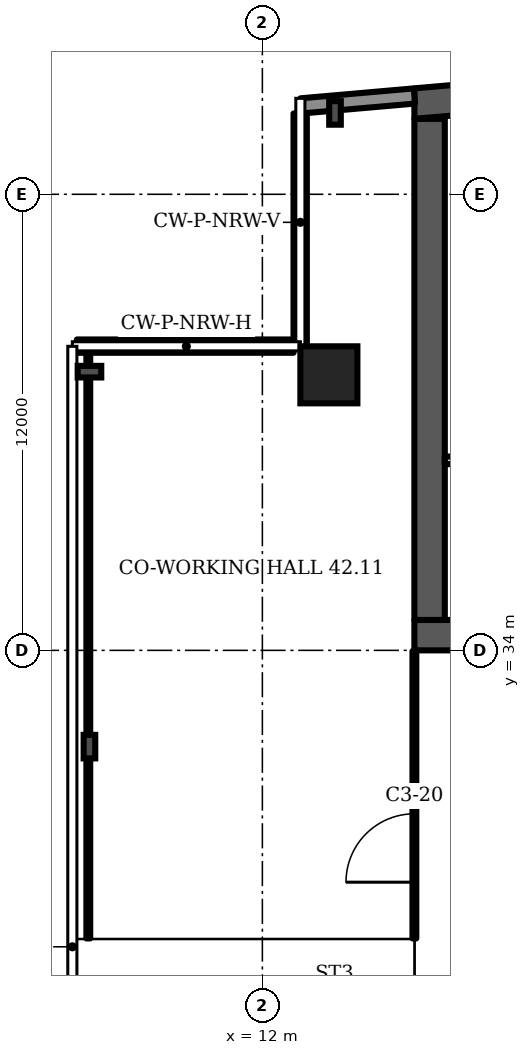
"""IFC4 building model, lengths in metres.
Left out: names, types, materials, properties, quantities, classifications, styles, units other than length and angle.
Written with IfcOpenShell. Run it as: python <this file> out.ifc"""

import sys

from ifc_helpers import new_model, si_unit, direction, frame, frame_2d, origin, origin_2d, place, context, subcontext, project, spatial, polyline, rectangle, i_section, outline, extrude, element, fill, save


model = new_model("IFC4")
c1 = context("Model", 3, precision=1e-05, world=origin(), true_north=direction((0.0, 1.0)))
c2 = subcontext(c1, "Body", "Model", "MODEL_VIEW")
j1 = project(units=[si_unit("LENGTHUNIT", "METRE"), si_unit("PLANEANGLEUNIT", "RADIAN")], contexts=[c1])
p1 = place(None, origin())
s1 = spatial("IfcSite", under=j1, at=p1, CompositionType="ELEMENT")
p2 = place(p1, origin())
s2 = spatial("IfcBuilding", under=s1, at=p2, CompositionType="ELEMENT")
p3 = place(p2, frame((0.0, 0.0, 173.5)))
s3 = spatial("IfcBuildingStorey", under=s2, at=p3, CompositionType="ELEMENT", Elevation=173.5)
p4 = place(p3, origin())
e1 = element("IfcWall", 1, at=p4, inside=s3, PredefinedType="SHEAR", context=c2, shape_type="SweptSolid", body=[
    extrude(outline(polyline([(16.0, 47.984), (37.0, 49.822), (58.0, 47.984), (58.0, 48.787), (37.0, 50.625), (16.0, 48.787), (16.0, 47.984)])), origin(), (0.0, 0.0, 1.0), 3.6),
])
p5 = place(p3, frame((16.0, 34.4, 0.0), z_axis=(0.0, 0.0, 1.0), x_axis=(1.0, 0.0, 0.0)))
e2 = element("IfcWall", 2, at=p5, inside=s3, PredefinedType="SHEAR", context=c2, shape_type="SweptSolid", body=[
    extrude(rectangle(XDim=42.0, YDim=0.8, at=frame_2d((21.0, 0.0))), origin(), (0.0, 0.0, 1.0), 3.6),
])
p6 = place(p5, frame((3.2, 0.0, 0.0)))
e3 = element("IfcOpeningElement", 3, at=p6, cuts=e2, PredefinedType="OPENING", context=c2, shape_type="SweptSolid", body=[
    extrude(rectangle(XDim=1.0, YDim=2.1, at=frame_2d((0.5, 1.05))), frame((0.0, 0.41, 0.0), z_axis=(0.0, -1.0, 0.0), x_axis=(1.0, 0.0, 0.0)), (0.0, 0.0, 1.0), 0.82),
])
p7 = place(p5, frame((7.65, 0.0, 0.0)))
e4 = element("IfcOpeningElement", 4, at=p7, cuts=e2, PredefinedType="OPENING", context=c2, shape_type="SweptSolid", body=[
    extrude(rectangle(XDim=1.2, YDim=2.1, at=frame_2d((0.6, 1.05))), frame((0.0, 0.41, 0.0), z_axis=(0.0, -1.0, 0.0), x_axis=(1.0, 0.0, 0.0)), (0.0, 0.0, 1.0), 0.82),
])
p8 = place(p5, frame((14.767, 0.0, 0.0)))
e5 = element("IfcOpeningElement", 5, at=p8, cuts=e2, PredefinedType="OPENING", context=c2, shape_type="SweptSolid", body=[
    extrude(rectangle(XDim=1.1, YDim=2.1, at=frame_2d((0.55, 1.05))), frame((0.0, 0.41, 0.0), z_axis=(0.0, -1.0, 0.0), x_axis=(1.0, 0.0, 0.0)), (0.0, 0.0, 1.0), 0.82),
])
p9 = place(p5, frame((19.133, 0.0, 0.0)))
e6 = element("IfcOpeningElement", 6, at=p9, cuts=e2, PredefinedType="OPENING", context=c2, shape_type="SweptSolid", body=[
    extrude(rectangle(XDim=1.1, YDim=2.1, at=frame_2d((0.55, 1.05))), frame((0.0, 0.41, 0.0), z_axis=(0.0, -1.0, 0.0), x_axis=(1.0, 0.0, 0.0)), (0.0, 0.0, 1.0), 0.82),
])
p10 = place(p5, frame((16.8, 0.0, 0.0)))
e7 = element("IfcOpeningElement", 7, at=p10, cuts=e2, PredefinedType="OPENING", context=c2, shape_type="SweptSolid", body=[
    extrude(rectangle(XDim=1.4, YDim=2.1, at=frame_2d((0.7, 1.05))), frame((0.0, 0.41, 0.0), z_axis=(0.0, -1.0, 0.0), x_axis=(1.0, 0.0, 0.0)), (0.0, 0.0, 1.0), 0.82),
])
p11 = place(p5, frame((21.767, 0.0, 0.0)))
e8 = element("IfcOpeningElement", 8, at=p11, cuts=e2, PredefinedType="OPENING", context=c2, shape_type="SweptSolid", body=[
    extrude(rectangle(XDim=1.1, YDim=2.1, at=frame_2d((0.55, 1.05))), frame((0.0, 0.41, 0.0), z_axis=(0.0, -1.0, 0.0), x_axis=(1.0, 0.0, 0.0)), (0.0, 0.0, 1.0), 0.82),
])
p12 = place(p5, frame((23.95, 0.0, 0.0)))
e9 = element("IfcOpeningElement", 9, at=p12, cuts=e2, PredefinedType="OPENING", context=c2, shape_type="SweptSolid", body=[
    extrude(rectangle(XDim=1.1, YDim=2.1, at=frame_2d((0.55, 1.05))), frame((0.0, 0.41, 0.0), z_axis=(0.0, -1.0, 0.0), x_axis=(1.0, 0.0, 0.0)), (0.0, 0.0, 1.0), 0.82),
])
p13 = place(p5, frame((26.133, 0.0, 0.0)))
e10 = element("IfcOpeningElement", 10, at=p13, cuts=e2, PredefinedType="OPENING", context=c2, shape_type="SweptSolid", body=[
    extrude(rectangle(XDim=1.1, YDim=2.1, at=frame_2d((0.55, 1.05))), frame((0.0, 0.41, 0.0), z_axis=(0.0, -1.0, 0.0), x_axis=(1.0, 0.0, 0.0)), (0.0, 0.0, 1.0), 0.82),
])
p14 = place(p5, frame((33.15, 0.0, 0.0)))
e11 = element("IfcOpeningElement", 11, at=p14, cuts=e2, PredefinedType="OPENING", context=c2, shape_type="SweptSolid", body=[
    extrude(rectangle(XDim=1.2, YDim=2.1, at=frame_2d((0.6, 1.05))), frame((0.0, 0.41, 0.0), z_axis=(0.0, -1.0, 0.0), x_axis=(1.0, 0.0, 0.0)), (0.0, 0.0, 1.0), 0.82),
])
p15 = place(p5, frame((35.817, 0.0, 0.0)))
e12 = element("IfcOpeningElement", 12, at=p15, cuts=e2, PredefinedType="OPENING", context=c2, shape_type="SweptSolid", body=[
    extrude(rectangle(XDim=1.0, YDim=2.1, at=frame_2d((0.5, 1.05))), frame((0.0, 0.41, 0.0), z_axis=(0.0, -1.0, 0.0), x_axis=(1.0, 0.0, 0.0)), (0.0, 0.0, 1.0), 0.82),
])
p16 = place(p5, frame((39.95, 0.0, 0.0)))
e13 = element("IfcOpeningElement", 13, at=p16, cuts=e2, PredefinedType="OPENING", context=c2, shape_type="SweptSolid", body=[
    extrude(rectangle(XDim=1.0, YDim=2.1, at=frame_2d((0.5, 1.05))), frame((0.0, 0.41, 0.0), z_axis=(0.0, -1.0, 0.0), x_axis=(1.0, 0.0, 0.0)), (0.0, 0.0, 1.0), 0.82),
])
p17 = place(p5, frame((37.767, 0.0, 0.0)))
e14 = element("IfcOpeningElement", 14, at=p17, cuts=e2, PredefinedType="OPENING", context=c2, shape_type="SweptSolid", body=[
    extrude(rectangle(XDim=1.4, YDim=2.1, at=frame_2d((0.7, 1.05))), frame((0.0, 0.41, 0.0), z_axis=(0.0, -1.0, 0.0), x_axis=(1.0, 0.0, 0.0)), (0.0, 0.0, 1.0), 0.82),
])
p18 = place(p3, frame((16.4, 34.8, 0.0), z_axis=(0.0, 0.0, 1.0), x_axis=(0.0, 1.0, 0.0)))
e15 = element("IfcWall", 15, at=p18, inside=s3, PredefinedType="SHEAR", context=c2, shape_type="SweptSolid", body=[
    extrude(rectangle(XDim=13.184, YDim=0.8, at=frame_2d((6.592, 0.0))), origin(), (0.0, 0.0, 1.0), 3.6),
])
p19 = place(p3, frame((13.75, 41.25, 0.0), z_axis=(0.0, 0.0, 1.0), x_axis=(1.0, 0.0, 0.0)))
e16 = element("IfcColumn", 16, at=p19, inside=s3, PredefinedType="COLUMN", context=c2, shape_type="SweptSolid", body=[
    extrude(rectangle(XDim=1.5, YDim=1.5, at=origin_2d()), origin(), (0.0, 0.0, 1.0), 3.6),
])
for number, where, z_axis, x_axis in (
    (17, (13.911, 48.141, 0.0), (0.0, 0.0, 1.0), (-1.0, 0.0, 0.0)),
    (18, (7.45, 41.333, 0.0), (0.0, 0.0, 1.0), (0.0, 1.0, 0.0)),
    (19, (7.45, 31.467, 0.0), (0.0, 0.0, 1.0), (-1.0, 0.0, 0.0)),
):
    element("IfcColumn", number, at=place(p3, frame(where, z_axis=z_axis, x_axis=x_axis)), inside=s3, PredefinedType="COLUMN", context=c2, shape_type="SweptSolid", body=[
        extrude(i_section(OverallWidth=0.305, OverallDepth=0.62, WebThickness=0.021, FlangeThickness=0.04, FilletRadius=0.027, at=origin_2d()), origin(), (0.0, 0.0, 1.0), 3.6),
    ])
p20 = place(p3, frame((16.0, 48.587, 0.0), z_axis=(0.0, 0.0, 1.0), x_axis=(-0.996194, -0.087168, 0.0)))
e20 = element("IfcWall", 20, at=p20, inside=s3, PredefinedType="SOLIDWALL", context=c2, shape_type="SweptSolid", body=[
    extrude(rectangle(XDim=2.994, YDim=0.4, at=frame_2d((1.497, 0.0))), origin(), (0.0, 0.0, 1.0), 3.2),
])
p21 = place(p3, frame((12.995, 48.126, 0.0), z_axis=(0.0, 0.0, 1.0), x_axis=(0.0, -1.0, 0.0)))
e21 = element("IfcWall", 21, at=p21, inside=s3, PredefinedType="SOLIDWALL", context=c2, shape_type="SweptSolid", body=[
    extrude(rectangle(XDim=6.126, YDim=0.35, at=frame_2d((3.063, 0.0))), origin(), (0.0, 0.0, 1.0), 1.0),
])
p22 = place(p3, frame((12.82, 42.005, 0.0), z_axis=(0.0, 0.0, 1.0), x_axis=(-1.0, 0.0, 0.0)))
e22 = element("IfcWall", 22, at=p22, inside=s3, PredefinedType="SOLIDWALL", context=c2, shape_type="SweptSolid", body=[
    extrude(rectangle(XDim=5.7, YDim=0.35, at=frame_2d((2.85, 0.0))), origin(), (0.0, 0.0, 1.0), 1.0),
])
p23 = place(p3, frame((16.8, 39.0, 0.0), z_axis=(0.0, 0.0, 1.0), x_axis=(1.0, 0.0, 0.0)))
e23 = element("IfcWall", 23, at=p23, inside=s3, PredefinedType="PARTITIONING", context=c2, shape_type="SweptSolid", body=[
    extrude(rectangle(XDim=5.8, YDim=0.2, at=frame_2d((2.9, 0.0))), origin(), (0.0, 0.0, 1.0), 3.2),
])
p24 = place(p23, frame((2.4, 0.0, 0.0)))
e24 = element("IfcOpeningElement", 24, at=p24, cuts=e23, PredefinedType="OPENING", context=c2, shape_type="SweptSolid", body=[
    extrude(rectangle(XDim=1.0, YDim=2.1, at=frame_2d((0.5, 1.05))), frame((0.0, 0.11, 0.0), z_axis=(0.0, -1.0, 0.0), x_axis=(1.0, 0.0, 0.0)), (0.0, 0.0, 1.0), 0.22),
])
p25 = place(p3, frame((7.42, 26.42, 0.0), z_axis=(0.0, 0.0, 1.0), x_axis=(0.0, 1.0, 0.0)))
e25 = element("IfcWall", 25, at=p25, inside=s3, PredefinedType="PARTITIONING", context=c2, shape_type="SweptSolid", body=[
    extrude(rectangle(XDim=15.56, YDim=0.1, at=frame_2d((7.78, 0.0))), origin(), (0.0, 0.0, 1.0), 2.58),
])
p26 = place(p3, frame((16.0, 26.42, 0.0), z_axis=(0.0, 0.0, 1.0), x_axis=(0.0, 1.0, 0.0)))
e26 = element("IfcWall", 26, at=p26, inside=s3, PredefinedType="PARTITIONING", context=c2, shape_type="SweptSolid", body=[
    extrude(rectangle(XDim=7.56, YDim=0.1, at=frame_2d((3.78, 0.0))), origin(), (0.0, 0.0, 1.0), 3.2),
])
p27 = place(p26, frame((1.48, 0.0, 0.0)))
e27 = element("IfcOpeningElement", 27, at=p27, cuts=e26, PredefinedType="OPENING", context=c2, shape_type="SweptSolid", body=[
    extrude(rectangle(XDim=1.8, YDim=2.1, at=frame_2d((0.9, 1.05))), frame((0.0, 0.06, 0.0), z_axis=(0.0, -1.0, 0.0), x_axis=(1.0, 0.0, 0.0)), (0.0, 0.0, 1.0), 0.12),
])
p28 = place(p27, origin())
e28 = element("IfcDoor", 28, at=p28, inside=s3, OperationType="DOUBLE_DOOR_SINGLE_SWING", PredefinedType="DOOR", context=c2, shape_type="SweptSolid", body=[
    extrude(rectangle(XDim=1.8, YDim=2.1, at=frame_2d((0.9, 1.05))), frame((0.0, 0.025, 0.0), z_axis=(0.0, -1.0, 0.0), x_axis=(1.0, 0.0, 0.0)), (0.0, 0.0, 1.0), 0.05),
])
fill(e27, e28)
save(model, sys.argv[1])
